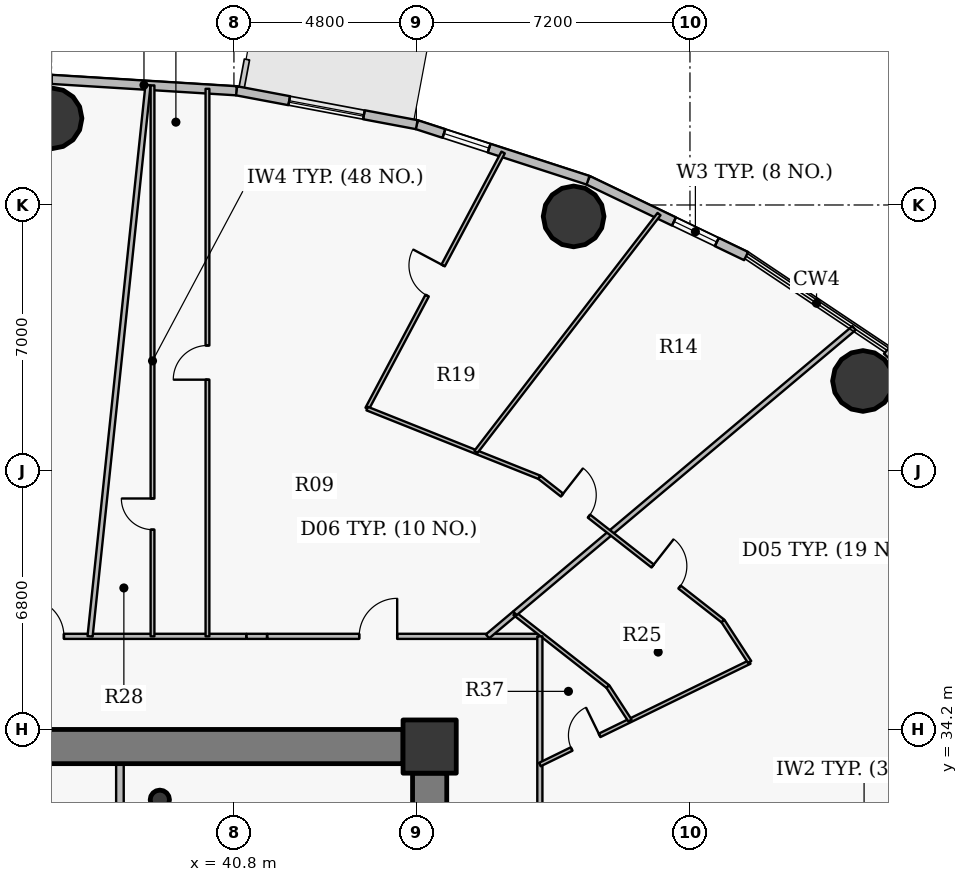
"""IFC4 building model, lengths in metres.
Left out: names, types, materials, properties, quantities, classifications, styles, units other than length and angle.
Written with IfcOpenShell. Run it as: python <this file> out.ifc"""

import sys

from ifc_helpers import new_model, si_unit, direction, frame, frame_2d, origin, origin_2d, place, context, subcontext, project, spatial, rectangle, hollow_circle, extrude, source, transform, mapped, element, fill, save


model = new_model("IFC4")
c1 = context("Model", 3, precision=1e-05, world=origin(), true_north=direction((0.0, 1.0)))
c2 = subcontext(c1, "Body", "Model", "MODEL_VIEW")
j1 = project(units=[si_unit("LENGTHUNIT", "METRE"), si_unit("PLANEANGLEUNIT", "RADIAN")], contexts=[c1])
p1 = place(None, origin())
s1 = spatial("IfcSite", under=j1, at=p1, CompositionType="ELEMENT")
p2 = place(p1, origin())
s2 = spatial("IfcBuilding", under=s1, at=p2, CompositionType="ELEMENT")
p3 = place(p2, frame((0.0, 0.0, 66.0)))
s3 = spatial("IfcBuildingStorey", under=s2, at=p3, CompositionType="ELEMENT", Elevation=66.0)
p4 = place(p3, frame((45.95, 33.75, 0.0), z_axis=(0.0, 0.0, 1.0), x_axis=(1.0, 0.0, 0.0)))
e1 = element("IfcColumn", 1, at=p4, inside=s3, PredefinedType="COLUMN", context=c2, shape_type="SweptSolid", body=[
    extrude(rectangle(XDim=1.4, YDim=1.4, at=origin_2d()), origin(), (0.0, 0.0, 1.0), 4.2),
])
p5 = place(p3, frame((38.85, 32.35, 0.0), z_axis=(0.0, 0.0, 1.0), x_axis=(1.0, 0.0, 0.0)))
e2 = element("IfcColumn", 2, at=p5, inside=s3, PredefinedType="COLUMN", context=c2, shape_type="SweptSolid", body=[
    extrude(hollow_circle(Radius=0.254, WallThickness=0.02, at=origin_2d()), origin(), (0.0, 0.0, 1.0), 4.2),
])
p6 = place(p3, frame((26.75, 33.75, 0.0), z_axis=(0.0, 0.0, 1.0), x_axis=(1.0, 0.0, 0.0)))
e3 = element("IfcWall", 3, at=p6, inside=s3, PredefinedType="SHEAR", context=c2, shape_type="SweptSolid", body=[
    extrude(rectangle(XDim=18.5, YDim=0.9, at=frame_2d((9.25, 0.0))), origin(), (0.0, 0.0, 1.0), 3.4),
])
p7 = place(p3, frame((45.95, 33.05, 0.0), z_axis=(0.0, 0.0, 1.0), x_axis=(0.0, -1.0, 0.0)))
e4 = element("IfcWall", 4, at=p7, inside=s3, PredefinedType="SHEAR", context=c2, shape_type="SweptSolid", body=[
    extrude(rectangle(XDim=12.1, YDim=0.9, at=frame_2d((6.05, 0.0))), origin(), (0.0, 0.0, 1.0), 3.4),
])
p8 = place(p7, frame((5.64, 0.0, 0.0)))
e5 = element("IfcOpeningElement", 5, at=p8, cuts=e4, PredefinedType="OPENING", context=c2, shape_type="SweptSolid", body=[
    extrude(rectangle(XDim=0.82, YDim=2.1, at=origin_2d()), frame((0.41, 0.46, 1.05), z_axis=(0.0, -1.0, 0.0), x_axis=(1.0, 0.0, 0.0)), (0.0, 0.0, 1.0), 0.92),
])
for number, where, z_axis, x_axis in (
    (6, (57.353, 43.369, 0.0), (0.0, 0.0, 1.0), (1.0, 0.0, 0.0)),
    (7, (49.738, 47.699, 0.0), (0.0, 0.0, 1.0), (1.0, 0.0, 0.0)),
    (8, (36.0, 50.28, 0.0), (0.0, 0.0, 1.0), (1.0, 0.0, 0.0)),
):
    element("IfcColumn", number, at=place(p3, frame(where, z_axis=z_axis, x_axis=x_axis)), inside=s3, PredefinedType="COLUMN", context=c2, shape_type="SweptSolid", body=[
        extrude(hollow_circle(Radius=0.8, WallThickness=0.045, at=origin_2d()), origin(), (0.0, 0.0, 1.0), 4.2),
    ])
p9 = place(p3, frame((57.985, 44.176, 0.0), z_axis=(0.0, 0.0, 1.0), x_axis=(0.737116376281, -0.67576582321, 0.0)))
e9 = element("IfcWall", 9, at=p9, inside=s3, PredefinedType="SOLIDWALL", context=c2, shape_type="SweptSolid", body=[
    extrude(rectangle(XDim=4.294, YDim=0.24, at=frame_2d((2.147, 0.0))), origin(), (0.0, 0.0, 1.0), 3.95),
])
p10 = place(p9, frame((1.147, 0.0, 0.9)))
e10 = element("IfcOpeningElement", 10, at=p10, cuts=e9, PredefinedType="OPENING", context=c2, shape_type="SweptSolid", body=[
    extrude(rectangle(XDim=2.0, YDim=1.75, at=origin_2d()), frame((1.0, 0.13, 0.875), z_axis=(0.0, -1.0, 0.0), x_axis=(1.0, 0.0, 0.0)), (0.0, 0.0, 1.0), 0.26),
])
p11 = place(p3, frame((50.118, 48.651, 0.0), z_axis=(0.0, 0.0, 1.0), x_axis=(0.901601503137, -0.432567601123, 0.0)))
e11 = element("IfcWall", 11, at=p11, inside=s3, PredefinedType="SOLIDWALL", context=c2, shape_type="SweptSolid", body=[
    extrude(rectangle(XDim=4.613, YDim=0.24, at=frame_2d((2.306, 0.0))), origin(), (0.0, 0.0, 1.0), 3.95),
])
p12 = place(p11, frame((2.508, 0.0, 0.9)))
e12 = element("IfcOpeningElement", 12, at=p12, cuts=e11, PredefinedType="OPENING", context=c2, shape_type="SweptSolid", body=[
    extrude(rectangle(XDim=1.25, YDim=1.65, at=origin_2d()), frame((0.625, 0.13, 0.825), z_axis=(0.0, -1.0, 0.0), x_axis=(1.0, 0.0, 0.0)), (0.0, 0.0, 1.0), 0.26),
])
p13 = place(p3, frame((45.611, 50.113, 0.0), z_axis=(0.0, 0.0, 1.0), x_axis=(0.951207699013, -0.308551313946, 0.0)))
e13 = element("IfcWall", 13, at=p13, inside=s3, PredefinedType="SOLIDWALL", context=c2, shape_type="SweptSolid", body=[
    extrude(rectangle(XDim=4.739, YDim=0.24, at=frame_2d((2.369, 0.0))), origin(), (0.0, 0.0, 1.0), 3.95),
])
p14 = place(p13, frame((0.751, 0.0, 0.9)))
e14 = element("IfcOpeningElement", 14, at=p14, cuts=e13, PredefinedType="OPENING", context=c2, shape_type="SweptSolid", body=[
    extrude(rectangle(XDim=1.25, YDim=1.65, at=origin_2d()), frame((0.625, 0.13, 0.825), z_axis=(0.0, -1.0, 0.0), x_axis=(1.0, 0.0, 0.0)), (0.0, 0.0, 1.0), 0.26),
])
p15 = place(p3, frame((40.865, 51.005, 0.0), z_axis=(0.0, 0.0, 1.0), x_axis=(0.982791952378, -0.184715939598, 0.0)))
e15 = element("IfcWall", 15, at=p15, inside=s3, PredefinedType="SOLIDWALL", context=c2, shape_type="SweptSolid", body=[
    extrude(rectangle(XDim=4.828, YDim=0.24, at=frame_2d((2.414, 0.0))), origin(), (0.0, 0.0, 1.0), 3.95),
])
p16 = place(p15, frame((1.414, 0.0, 0.9)))
e16 = element("IfcOpeningElement", 16, at=p16, cuts=e15, PredefinedType="OPENING", context=c2, shape_type="SweptSolid", body=[
    extrude(rectangle(XDim=2.0, YDim=1.75, at=origin_2d()), frame((1.0, 0.13, 0.875), z_axis=(0.0, -1.0, 0.0), x_axis=(1.0, 0.0, 0.0)), (0.0, 0.0, 1.0), 0.26),
])
p17 = place(p3, frame((36.0, 51.305, 0.0), z_axis=(0.0, 0.0, 1.0), x_axis=(0.998106954071, -0.061502099433, 0.0)))
e17 = element("IfcWall", 17, at=p17, inside=s3, PredefinedType="SOLIDWALL", context=c2, shape_type="SweptSolid", body=[
    extrude(rectangle(XDim=4.875, YDim=0.24, at=frame_2d((2.438, 0.0))), origin(), (0.0, 0.0, 1.0), 3.95),
])
p18 = place(p3, frame((32.088, 36.65, 0.0), z_axis=(0.0, 0.0, 1.0), x_axis=(1.0, 0.0, 0.0)))
e18 = element("IfcWall", 18, at=p18, inside=s3, PredefinedType="PARTITIONING", context=c2, shape_type="SweptSolid", body=[
    extrude(rectangle(XDim=9.036, YDim=0.135, at=frame_2d((4.518, 0.0))), origin(), (0.0, 0.0, 1.0), 3.285),
])
p19 = place(p18, frame((3.238, 0.0, 0.0)))
e19 = element("IfcOpeningElement", 19, at=p19, cuts=e18, PredefinedType="OPENING", context=c2, shape_type="SweptSolid", body=[
    extrude(rectangle(XDim=1.0, YDim=2.15, at=origin_2d()), frame((0.5, 0.078, 1.075), z_axis=(0.0, -1.0, 0.0), x_axis=(1.0, 0.0, 0.0)), (0.0, 0.0, 1.0), 0.155),
])
p20 = place(p3, frame((37.014, 36.65, 0.0), z_axis=(0.0, 0.0, 1.0), x_axis=(0.104529666954, 0.994521768855, 0.0)))
e20 = element("IfcWall", 20, at=p20, inside=s3, PredefinedType="PARTITIONING", context=c2, shape_type="SweptSolid", body=[
    extrude(rectangle(XDim=14.583, YDim=0.135, at=frame_2d((7.292, 0.0))), origin(), (0.0, 0.0, 1.0), 3.335),
])
p21 = place(p3, frame((37.8, 31.05, 0.0), z_axis=(0.0, 0.0, 1.0), x_axis=(0.0, 1.0, 0.0)))
e21 = element("IfcWall", 21, at=p21, inside=s3, PredefinedType="PARTITIONING", context=c2, shape_type="SweptSolid", body=[
    extrude(rectangle(XDim=2.25, YDim=0.2, at=frame_2d((1.125, 0.0))), origin(), (0.0, 0.0, 1.0), 3.535),
])
p22 = place(p3, frame((38.657, 36.65, 0.0), z_axis=(0.0, 0.0, 1.0), x_axis=(0.0, 1.0, 0.0)))
e22 = element("IfcWall", 22, at=p22, inside=s3, PredefinedType="PARTITIONING", context=c2, shape_type="SweptSolid", body=[
    extrude(rectangle(XDim=14.496, YDim=0.1, at=frame_2d((7.248, 0.0))), origin(), (0.0, 0.0, 1.0), 3.335),
])
p23 = place(p22, frame((2.807, 0.0, 0.0)))
e23 = element("IfcOpeningElement", 23, at=p23, cuts=e22, PredefinedType="OPENING", context=c2, shape_type="SweptSolid", body=[
    extrude(rectangle(XDim=0.82, YDim=2.1, at=origin_2d()), frame((0.41, 0.06, 1.05), z_axis=(0.0, -1.0, 0.0), x_axis=(1.0, 0.0, 0.0)), (0.0, 0.0, 1.0), 0.12),
])
p24 = place(p3, frame((40.104, 36.65, 0.0), z_axis=(0.0, 0.0, 1.0), x_axis=(0.0, 1.0, 0.0)))
e24 = element("IfcWall", 24, at=p24, inside=s3, PredefinedType="PARTITIONING", context=c2, shape_type="SweptSolid", body=[
    extrude(rectangle(XDim=14.407, YDim=0.1, at=frame_2d((7.204, 0.0))), origin(), (0.0, 0.0, 1.0), 3.335),
])
p25 = place(p24, frame((6.754, 0.0, 0.0)))
e25 = element("IfcOpeningElement", 25, at=p25, cuts=e24, PredefinedType="OPENING", context=c2, shape_type="SweptSolid", body=[
    extrude(rectangle(XDim=0.9, YDim=2.1, at=origin_2d()), frame((0.45, 0.06, 1.05), z_axis=(0.0, -1.0, 0.0), x_axis=(1.0, 0.0, 0.0)), (0.0, 0.0, 1.0), 0.12),
])
p26 = place(p3, frame((41.679, 36.65, 0.0), z_axis=(0.0, 0.0, 1.0), x_axis=(1.0, 0.0, 0.0)))
e26 = element("IfcWall", 26, at=p26, inside=s3, PredefinedType="PARTITIONING", context=c2, shape_type="SweptSolid", body=[
    extrude(rectangle(XDim=7.171, YDim=0.135, at=frame_2d((3.586, 0.0))), origin(), (0.0, 0.0, 1.0), 3.285),
])
p27 = place(p26, frame((2.417, 0.0, 0.0)))
e27 = element("IfcOpeningElement", 27, at=p27, cuts=e26, PredefinedType="OPENING", context=c2, shape_type="SweptSolid", body=[
    extrude(rectangle(XDim=1.0, YDim=2.15, at=origin_2d()), frame((0.5, 0.078, 1.075), z_axis=(0.0, -1.0, 0.0), x_axis=(1.0, 0.0, 0.0)), (0.0, 0.0, 1.0), 0.155),
])
p28 = place(p3, frame((44.306, 42.643, 0.0), z_axis=(0.0, 0.0, 1.0), x_axis=(0.468943074609, 0.883228392193, 0.0)))
e28 = element("IfcWall", 28, at=p28, inside=s3, PredefinedType="PARTITIONING", context=c2, shape_type="SweptSolid", body=[
    extrude(rectangle(XDim=7.629, YDim=0.1, at=frame_2d((3.814, 0.0))), origin(), (0.0, 0.0, 1.0), 3.335),
])
p29 = place(p28, frame((3.365, 0.0, 0.0)))
e29 = element("IfcOpeningElement", 29, at=p29, cuts=e28, PredefinedType="OPENING", context=c2, shape_type="SweptSolid", body=[
    extrude(rectangle(XDim=0.9, YDim=2.1, at=origin_2d()), frame((0.45, 0.06, 1.05), z_axis=(0.0, -1.0, 0.0), x_axis=(1.0, 0.0, 0.0)), (0.0, 0.0, 1.0), 0.12),
])
p30 = place(p3, frame((44.306, 42.643, 0.0), z_axis=(0.0, 0.0, 1.0), x_axis=(0.928800719386, -0.37057957805, 0.0)))
e30 = element("IfcWall", 30, at=p30, inside=s3, PredefinedType="PARTITIONING", context=c2, shape_type="SweptSolid", body=[
    extrude(rectangle(XDim=4.879, YDim=0.1, at=frame_2d((2.439, 0.0))), origin(), (0.0, 0.0, 1.0), 3.285),
])
p31 = place(p3, frame((47.166, 41.502, 0.0), z_axis=(0.0, 0.0, 1.0), x_axis=(0.610084092609, 0.792336670832, 0.0)))
e31 = element("IfcWall", 31, at=p31, inside=s3, PredefinedType="PARTITIONING", context=c2, shape_type="SweptSolid", body=[
    extrude(rectangle(XDim=7.899, YDim=0.1, at=frame_2d((3.95, 0.0))), origin(), (0.0, 0.0, 1.0), 3.335),
])
p32 = place(p3, frame((47.473, 36.65, 0.0), z_axis=(0.0, 0.0, 1.0), x_axis=(0.765142102307, 0.643861447268, 0.0)))
e32 = element("IfcWall", 32, at=p32, inside=s3, PredefinedType="PARTITIONING", context=c2, shape_type="SweptSolid", body=[
    extrude(rectangle(XDim=0.932, YDim=0.135, at=frame_2d((0.466, 0.0))), origin(), (0.0, 0.0, 1.0), 3.95),
])
p33 = place(p3, frame((48.186, 37.25, 0.0), z_axis=(0.0, 0.0, 1.0), x_axis=(0.787352897258, -0.61650256705, 0.0)))
e33 = element("IfcWall", 33, at=p33, inside=s3, PredefinedType="PARTITIONING", context=c2, shape_type="SweptSolid", body=[
    extrude(rectangle(XDim=3.117, YDim=0.1, at=frame_2d((1.558, 0.0))), origin(), (0.0, 0.0, 1.0), 3.285),
])
p34 = place(p3, frame((48.194, 37.256, 0.0), z_axis=(0.0, 0.0, 1.0), x_axis=(0.76528027527, 0.643697211647, 0.0)))
e34 = element("IfcWall", 34, at=p34, inside=s3, PredefinedType="PARTITIONING", context=c2, shape_type="SweptSolid", body=[
    extrude(rectangle(XDim=11.661, YDim=0.135, at=frame_2d((5.83, 0.0))), origin(), (0.0, 0.0, 1.0), 3.335),
])
p35 = place(p3, frame((48.837, 40.835, 0.0), z_axis=(0.0, 0.0, 1.0), x_axis=(0.787362261728, -0.616490607233, 0.0)))
e35 = element("IfcWall", 35, at=p35, inside=s3, PredefinedType="PARTITIONING", context=c2, shape_type="SweptSolid", body=[
    extrude(rectangle(XDim=6.137, YDim=0.1, at=frame_2d((3.068, 0.0))), origin(), (0.0, 0.0, 1.0), 3.285),
])
p36 = place(p35, frame((3.786, 0.0, 0.0)))
e36 = element("IfcOpeningElement", 36, at=p36, cuts=e35, PredefinedType="OPENING", context=c2, shape_type="SweptSolid", body=[
    extrude(rectangle(XDim=0.9, YDim=2.1, at=origin_2d()), frame((0.45, 0.06, 1.05), z_axis=(0.0, -1.0, 0.0), x_axis=(1.0, 0.0, 0.0)), (0.0, 0.0, 1.0), 0.12),
])
p37 = place(p35, frame((0.758, 0.0, 0.0)))
e37 = element("IfcOpeningElement", 37, at=p37, cuts=e35, PredefinedType="OPENING", context=c2, shape_type="SweptSolid", body=[
    extrude(rectangle(XDim=0.9, YDim=2.1, at=origin_2d()), frame((0.45, 0.06, 1.05), z_axis=(0.0, -1.0, 0.0), x_axis=(1.0, 0.0, 0.0)), (0.0, 0.0, 1.0), 0.12),
])
p38 = place(p3, frame((48.85, 24.742, 0.0), z_axis=(0.0, 0.0, 1.0), x_axis=(0.0, 1.0, 0.0)))
e38 = element("IfcWall", 38, at=p38, inside=s3, PredefinedType="PARTITIONING", context=c2, shape_type="SweptSolid", body=[
    extrude(rectangle(XDim=11.908, YDim=0.135, at=frame_2d((5.954, 0.0))), origin(), (0.0, 0.0, 1.0), 3.285),
])
p39 = place(p38, frame((6.262, 0.0, 0.0)))
e39 = element("IfcOpeningElement", 39, at=p39, cuts=e38, PredefinedType="OPENING", context=c2, shape_type="SweptSolid", body=[
    extrude(rectangle(XDim=1.0, YDim=2.15, at=origin_2d()), frame((0.5, 0.078, 1.075), z_axis=(0.0, -1.0, 0.0), x_axis=(1.0, 0.0, 0.0)), (0.0, 0.0, 1.0), 0.155),
])
p40 = place(p38, frame((2.015, 0.0, 0.0)))
e40 = element("IfcOpeningElement", 40, at=p40, cuts=e38, PredefinedType="OPENING", context=c2, shape_type="SweptSolid", body=[
    extrude(rectangle(XDim=1.0, YDim=2.15, at=origin_2d()), frame((0.5, 0.078, 1.075), z_axis=(0.0, -1.0, 0.0), x_axis=(1.0, 0.0, 0.0)), (0.0, 0.0, 1.0), 0.155),
])
p41 = place(p3, frame((48.85, 29.731, 0.0), z_axis=(0.0, 0.0, 1.0), x_axis=(0.97814985104, 0.207901103679, 0.0)))
e41 = element("IfcWall", 41, at=p41, inside=s3, PredefinedType="PARTITIONING", context=c2, shape_type="SweptSolid", body=[
    extrude(rectangle(XDim=17.444, YDim=0.135, at=frame_2d((8.722, 0.0))), origin(), (0.0, 0.0, 1.0), 3.335),
])
p42 = place(p3, frame((48.85, 33.277, 0.0), z_axis=(0.0, 0.0, 1.0), x_axis=(0.898537268474, 0.438897228476, 0.0)))
e42 = element("IfcWall", 42, at=p42, inside=s3, PredefinedType="PARTITIONING", context=c2, shape_type="SweptSolid", body=[
    extrude(rectangle(XDim=6.144, YDim=0.1, at=frame_2d((3.072, 0.0))), origin(), (0.0, 0.0, 1.0), 3.95),
])
p43 = place(p42, frame((0.93, 0.0, 0.0)))
e43 = element("IfcOpeningElement", 43, at=p43, cuts=e42, PredefinedType="OPENING", context=c2, shape_type="SweptSolid", body=[
    extrude(rectangle(XDim=0.82, YDim=2.1, at=origin_2d()), frame((0.41, 0.06, 1.05), z_axis=(0.0, -1.0, 0.0), x_axis=(1.0, 0.0, 0.0)), (0.0, 0.0, 1.0), 0.12),
])
p44 = place(p3, frame((50.64, 35.329, 0.0), z_axis=(0.0, 0.0, 1.0), x_axis=(0.545471206721, -0.838129561964, 0.0)))
e44 = element("IfcWall", 44, at=p44, inside=s3, PredefinedType="PARTITIONING", context=c2, shape_type="SweptSolid", body=[
    extrude(rectangle(XDim=1.066, YDim=0.1, at=frame_2d((0.533, 0.0))), origin(), (0.0, 0.0, 1.0), 3.95),
])
p45 = place(p3, frame((53.669, 37.052, 0.0), z_axis=(0.0, 0.0, 1.0), x_axis=(0.545381825814, -0.838187726033, 0.0)))
e45 = element("IfcWall", 45, at=p45, inside=s3, PredefinedType="PARTITIONING", context=c2, shape_type="SweptSolid", body=[
    extrude(rectangle(XDim=1.287, YDim=0.1, at=frame_2d((0.643, 0.0))), origin(), (0.0, 0.0, 1.0), 3.95),
])
p46 = place(p3, frame((41.134, 36.65, 0.0), z_axis=(0.0, 0.0, 1.0), x_axis=(1.0, 0.0, 0.0)))
e46 = element("IfcWall", 46, at=p46, inside=s3, PredefinedType="PARTITIONING", context=c2, shape_type="SweptSolid", body=[
    extrude(rectangle(XDim=0.535, YDim=0.135, at=frame_2d((0.268, 0.0))), origin(), (0.0, 0.0, 1.0), 3.95),
])
p47 = place(p3, frame((46.4, 34.2, 0.0), z_axis=(0.0, 0.0, 1.0), x_axis=(-1.0, 0.0, 0.0)))
e47 = element("IfcWall", 47, at=p47, inside=s3, PredefinedType="PARTITIONING", context=c2, shape_type="SweptSolid", body=[
    extrude(rectangle(XDim=1.14, YDim=0.135, at=frame_2d((0.57, 0.0))), origin(), (0.0, 0.0, 1.0), 3.285),
])
p48 = place(p3, frame((46.4, 33.06, 0.0), z_axis=(0.0, 0.0, 1.0), x_axis=(0.0, 1.0, 0.0)))
e48 = element("IfcWall", 48, at=p48, inside=s3, PredefinedType="PARTITIONING", context=c2, shape_type="SweptSolid", body=[
    extrude(rectangle(XDim=0.833, YDim=0.135, at=frame_2d((0.416, 0.0))), origin(), (0.0, 0.0, 1.0), 3.95),
])
m1 = source(origin(), c2, "Body", "SweptSolid", [
    extrude(rectangle(XDim=1.25, YDim=1.65, at=origin_2d()), frame((0.625, 0.03, 0.825), z_axis=(0.0, -1.0, 0.0), x_axis=(1.0, 0.0, 0.0)), (0.0, 0.0, 1.0), 0.06),
])
p49 = place(p12, origin())
e49 = element("IfcWindow", 49, at=p49, inside=s3, PartitioningType="SINGLE_PANEL", PredefinedType="WINDOW", context=c2, shape_type="MappedRepresentation", body=[
    mapped(m1, transform((0.0, 0.0, 0.0), x_axis=(1.0, 0.0, 0.0), y_axis=(0.0, 1.0, 0.0), z_axis=(0.0, 0.0, 1.0), scale=1.0)),
])
fill(e12, e49)
p50 = place(p14, origin())
e50 = element("IfcWindow", 50, at=p50, inside=s3, PartitioningType="SINGLE_PANEL", PredefinedType="WINDOW", context=c2, shape_type="MappedRepresentation", body=[
    mapped(m1, transform((0.0, 0.0, 0.0), x_axis=(1.0, 0.0, 0.0), y_axis=(0.0, 1.0, 0.0), z_axis=(0.0, 0.0, 1.0), scale=1.0)),
])
fill(e14, e50)
m2 = source(origin(), c2, "Body", "SweptSolid", [
    extrude(rectangle(XDim=2.0, YDim=1.75, at=origin_2d()), frame((1.0, 0.03, 0.875), z_axis=(0.0, -1.0, 0.0), x_axis=(1.0, 0.0, 0.0)), (0.0, 0.0, 1.0), 0.06),
])
p51 = place(p16, origin())
e51 = element("IfcWindow", 51, at=p51, inside=s3, PartitioningType="DOUBLE_PANEL_VERTICAL", PredefinedType="WINDOW", context=c2, shape_type="MappedRepresentation", body=[
    mapped(m2, transform((0.0, 0.0, 0.0), x_axis=(1.0, 0.0, 0.0), y_axis=(0.0, 1.0, 0.0), z_axis=(0.0, 0.0, 1.0), scale=1.0)),
])
fill(e16, e51)
m3 = source(origin(), c2, "Body", "SweptSolid", [
    extrude(rectangle(XDim=0.82, YDim=2.1, at=origin_2d()), frame((0.41, 0.025, 1.05), z_axis=(0.0, -1.0, 0.0), x_axis=(1.0, 0.0, 0.0)), (0.0, 0.0, 1.0), 0.05),
])
p52 = place(p43, origin())
e52 = element("IfcDoor", 52, at=p52, inside=s3, OperationType="SINGLE_SWING_RIGHT", PredefinedType="DOOR", context=c2, shape_type="MappedRepresentation", body=[
    mapped(m3, transform((0.0, 0.0, 0.0), x_axis=(1.0, 0.0, 0.0), y_axis=(0.0, 1.0, 0.0), z_axis=(0.0, 0.0, 1.0), scale=1.0)),
])
fill(e43, e52)
m4 = source(origin(), c2, "Body", "SweptSolid", [
    extrude(rectangle(XDim=0.9, YDim=2.1, at=origin_2d()), frame((0.45, 0.025, 1.05), z_axis=(0.0, -1.0, 0.0), x_axis=(1.0, 0.0, 0.0)), (0.0, 0.0, 1.0), 0.05),
])
p53 = place(p36, origin())
e53 = element("IfcDoor", 53, at=p53, inside=s3, OperationType="SINGLE_SWING_LEFT", PredefinedType="DOOR", context=c2, shape_type="MappedRepresentation", body=[
    mapped(m4, transform((0.0, 0.0, 0.0), x_axis=(1.0, 0.0, 0.0), y_axis=(0.0, 1.0, 0.0), z_axis=(0.0, 0.0, 1.0), scale=1.0)),
])
fill(e36, e53)
m5 = source(origin(), c2, "Body", "SweptSolid", [
    extrude(rectangle(XDim=1.0, YDim=2.15, at=origin_2d()), frame((0.5, 0.025, 1.075), z_axis=(0.0, -1.0, 0.0), x_axis=(1.0, 0.0, 0.0)), (0.0, 0.0, 1.0), 0.05),
])
p54 = place(p27, origin())
e54 = element("IfcDoor", 54, at=p54, inside=s3, OperationType="SINGLE_SWING_RIGHT", PredefinedType="DOOR", context=c2, shape_type="MappedRepresentation", body=[
    mapped(m5, transform((0.0, 0.0, 0.0), x_axis=(1.0, 0.0, 0.0), y_axis=(0.0, 1.0, 0.0), z_axis=(0.0, 0.0, 1.0), scale=1.0)),
])
fill(e27, e54)
p55 = place(p37, origin())
e55 = element("IfcDoor", 55, at=p55, inside=s3, OperationType="SINGLE_SWING_LEFT", PredefinedType="DOOR", context=c2, shape_type="MappedRepresentation", body=[
    mapped(m4, transform((0.0, 0.0, 0.0), x_axis=(1.0, 0.0, 0.0), y_axis=(0.0, 1.0, 0.0), z_axis=(0.0, 0.0, 1.0), scale=1.0)),
])
fill(e37, e55)
p56 = place(p29, origin())
e56 = element("IfcDoor", 56, at=p56, inside=s3, OperationType="SINGLE_SWING_RIGHT", PredefinedType="DOOR", context=c2, shape_type="MappedRepresentation", body=[
    mapped(m4, transform((0.0, 0.0, 0.0), x_axis=(1.0, 0.0, 0.0), y_axis=(0.0, 1.0, 0.0), z_axis=(0.0, 0.0, 1.0), scale=1.0)),
])
fill(e29, e56)
p57 = place(p25, origin())
e57 = element("IfcDoor", 57, at=p57, inside=s3, OperationType="SINGLE_SWING_LEFT", PredefinedType="DOOR", context=c2, shape_type="MappedRepresentation", body=[
    mapped(m4, transform((0.0, 0.0, 0.0), x_axis=(1.0, 0.0, 0.0), y_axis=(0.0, 1.0, 0.0), z_axis=(0.0, 0.0, 1.0), scale=1.0)),
])
fill(e25, e57)
p58 = place(p23, origin())
e58 = element("IfcDoor", 58, at=p58, inside=s3, OperationType="SINGLE_SWING_RIGHT", PredefinedType="DOOR", context=c2, shape_type="MappedRepresentation", body=[
    mapped(m3, transform((0.0, 0.0, 0.0), x_axis=(1.0, 0.0, 0.0), y_axis=(0.0, 1.0, 0.0), z_axis=(0.0, 0.0, 1.0), scale=1.0)),
])
fill(e23, e58)
p59 = place(p19, origin())
e59 = element("IfcDoor", 59, at=p59, inside=s3, OperationType="SINGLE_SWING_LEFT", PredefinedType="DOOR", context=c2, shape_type="MappedRepresentation", body=[
    mapped(m5, transform((0.0, 0.0, 0.0), x_axis=(1.0, 0.0, 0.0), y_axis=(0.0, 1.0, 0.0), z_axis=(0.0, 0.0, 1.0), scale=1.0)),
])
fill(e19, e59)
save(model, sys.argv[1])
